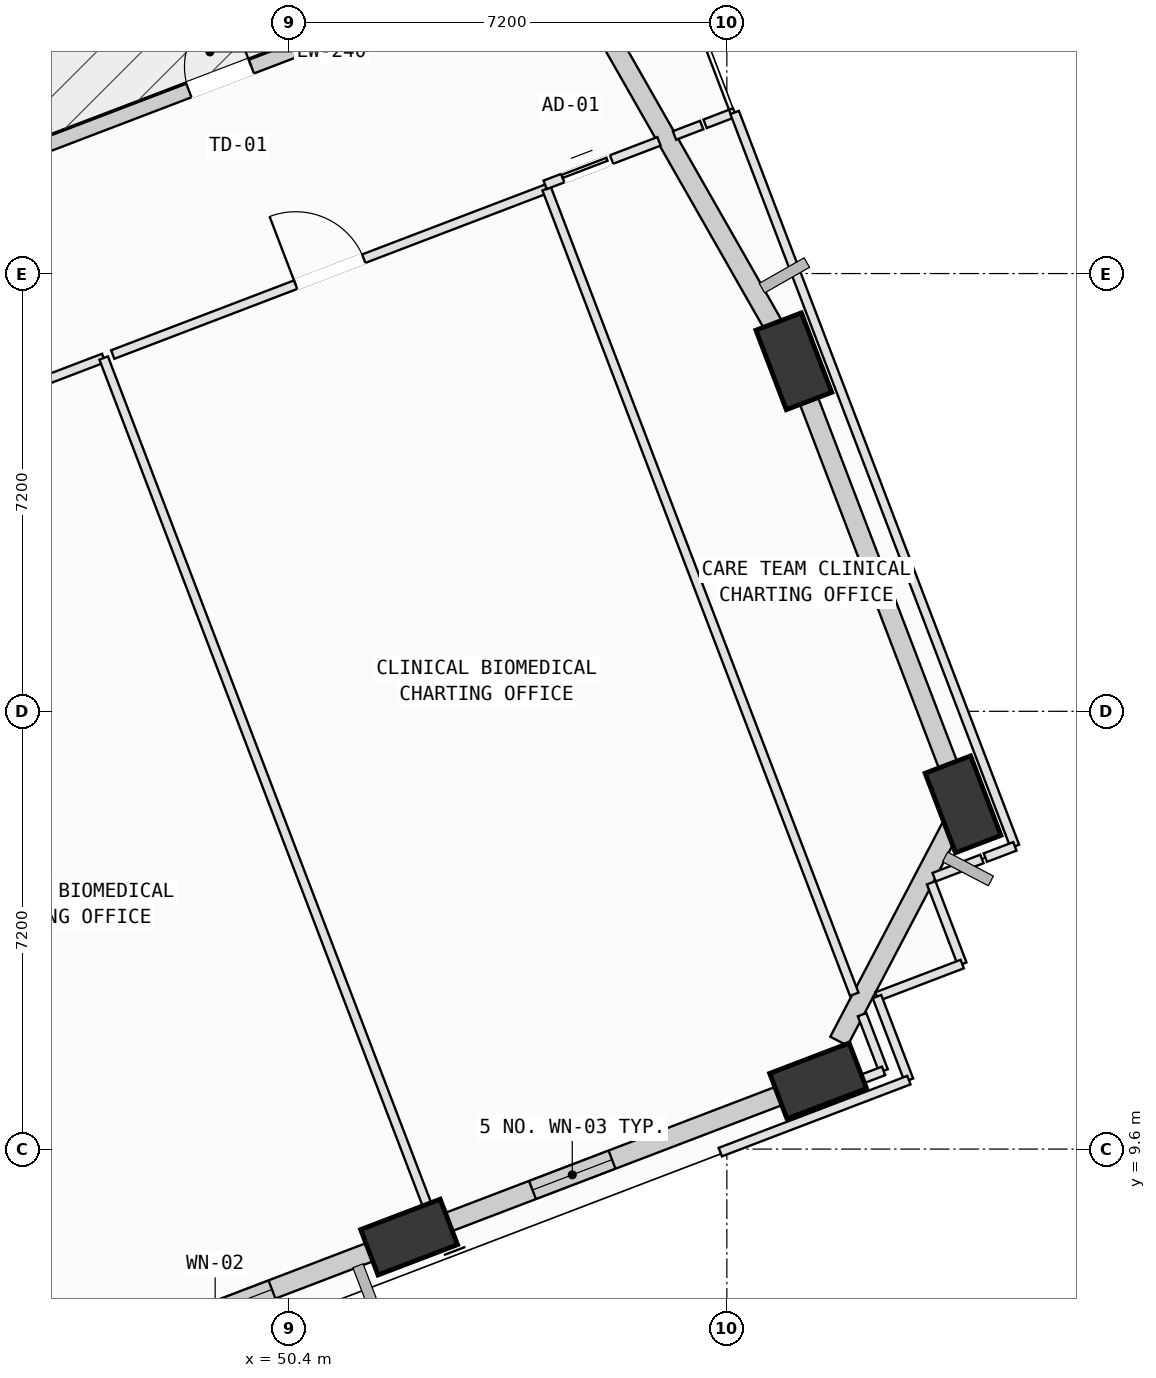
"""IFC4 building model, lengths in metres.
Left out: names, types, materials, properties, quantities, classifications, styles, units other than length and angle.
Written with IfcOpenShell. Run it as: python <this file> out.ifc"""

import sys

from ifc_helpers import new_model, si_unit, direction, frame, frame_2d, origin, origin_2d, place, context, subcontext, project, spatial, rectangle, extrude, element, fill, save


model = new_model("IFC4")
c1 = context("Model", 3, precision=1e-05, world=origin(), true_north=direction((0.0, 1.0)))
c2 = subcontext(c1, "Body", "Model", "MODEL_VIEW")
j1 = project(units=[si_unit("LENGTHUNIT", "METRE"), si_unit("PLANEANGLEUNIT", "RADIAN")], contexts=[c1])
p1 = place(None, origin())
s1 = spatial("IfcSite", under=j1, at=p1, CompositionType="ELEMENT")
p2 = place(p1, origin())
s2 = spatial("IfcBuilding", under=s1, at=p2, CompositionType="ELEMENT")
p3 = place(p2, frame((0.0, 0.0, 112.4)))
s3 = spatial("IfcBuildingStorey", under=s2, at=p3, CompositionType="ELEMENT", Elevation=112.4)
p4 = place(p3, frame((52.374, 8.152, 0.002), z_axis=(0.067994181617, 0.077959369986, 0.994635173266), x_axis=(-0.93727055229, 0.346644050033, 0.03690276937)))
e1 = element("IfcColumn", 1, at=p4, inside=s3, PredefinedType="COLUMN", context=c2, shape_type="SweptSolid", body=[
    extrude(rectangle(XDim=1.4, YDim=0.8, at=origin_2d()), origin(), (0.0, 0.0, 1.0), 4.018),
])
p5 = place(p3, frame((59.101, 10.721, 0.002), z_axis=(0.057071849794, 0.105470719226, 0.992783325478), x_axis=(-0.990177431799, 0.133110722868, 0.042780708428)))
e2 = element("IfcColumn", 2, at=p5, inside=s3, PredefinedType="COLUMN", context=c2, shape_type="SweptSolid", body=[
    extrude(rectangle(XDim=1.4, YDim=0.8, at=origin_2d()), origin(), (0.0, 0.0, 1.0), 4.025),
])
p6 = place(p3, frame((61.484, 15.271, 0.002), z_axis=(0.038263882911, 0.115094849072, 0.992617273163), x_axis=(0.045975598862, -0.992495561747, 0.113308447267)))
e3 = element("IfcColumn", 3, at=p6, inside=s3, PredefinedType="COLUMN", context=c2, shape_type="SweptSolid", body=[
    extrude(rectangle(XDim=1.4, YDim=0.8, at=origin_2d()), origin(), (0.0, 0.0, 1.0), 4.026),
])
p7 = place(p3, frame((58.702, 22.557, 0.002), z_axis=(0.008384963589, 0.103536072138, 0.994590354946), x_axis=(0.280571284109, -0.954915121336, 0.097040535741)))
e4 = element("IfcColumn", 4, at=p7, inside=s3, PredefinedType="COLUMN", context=c2, shape_type="SweptSolid", body=[
    extrude(rectangle(XDim=1.4, YDim=0.8, at=origin_2d()), origin(), (0.0, 0.0, 1.0), 4.018),
])
p8 = place(p3, frame((46.015, 25.966, 0.0), z_axis=(0.0, 0.0, 1.0), x_axis=(0.934206271621, 0.356733292621, 0.0)))
e5 = element("IfcWall", 5, at=p8, inside=s3, PredefinedType="SOLIDWALL", context=c2, shape_type="SweptSolid", body=[
    extrude(rectangle(XDim=6.96, YDim=0.24, at=frame_2d((3.48, 0.0))), origin(), (0.0, 0.0, 1.0), 2.945),
])
p9 = place(p8, frame((2.93, 0.0, 0.0)))
e6 = element("IfcOpeningElement", 6, at=p9, cuts=e5, PredefinedType="OPENING", context=c2, shape_type="SweptSolid", body=[
    extrude(rectangle(XDim=1.1, YDim=2.15, at=frame_2d((0.55, 1.075))), frame((0.0, 0.13, 0.0), z_axis=(0.0, -1.0, 0.0), x_axis=(1.0, 0.0, 0.0)), (0.0, 0.0, 1.0), 0.26),
])
p10 = place(p3, frame((52.091, 8.044, 0.0), z_axis=(0.0, 0.0, 1.0), x_axis=(-0.93419197885, -0.356770720005, 0.0)))
e7 = element("IfcWall", 7, at=p10, inside=s3, PredefinedType="SOLIDWALL", context=c2, shape_type="SweptSolid", body=[
    extrude(rectangle(XDim=6.218, YDim=0.32, at=frame_2d((3.109, 0.0))), origin(), (0.0, 0.0, 1.0), 3.165),
])
p11 = place(p10, frame((2.111, 0.0, 0.75)))
e8 = element("IfcOpeningElement", 8, at=p11, cuts=e7, PredefinedType="OPENING", context=c2, shape_type="SweptSolid", body=[
    extrude(rectangle(XDim=2.0, YDim=1.95, at=frame_2d((1.0, 0.975))), frame((0.0, 0.17, 0.0), z_axis=(0.0, -1.0, 0.0), x_axis=(1.0, 0.0, 0.0)), (0.0, 0.0, 1.0), 0.34),
])
p12 = place(p3, frame((58.832, 10.618, 0.0), z_axis=(0.0, 0.0, 1.0), x_axis=(-0.934193739587, -0.356766109541, 0.0)))
e9 = element("IfcWall", 9, at=p12, inside=s3, PredefinedType="SOLIDWALL", context=c2, shape_type="SweptSolid", body=[
    extrude(rectangle(XDim=6.242, YDim=0.32, at=frame_2d((3.121, 0.0))), origin(), (0.0, 0.0, 1.0), 3.165),
])
p13 = place(p12, frame((3.34, 0.0, 0.75)))
e10 = element("IfcOpeningElement", 10, at=p13, cuts=e9, PredefinedType="OPENING", context=c2, shape_type="SweptSolid", body=[
    extrude(rectangle(XDim=1.4, YDim=1.85, at=frame_2d((0.7, 0.925))), frame((0.0, 0.17, 0.0), z_axis=(0.0, -1.0, 0.0), x_axis=(1.0, 0.0, 0.0)), (0.0, 0.0, 1.0), 0.34),
])
p14 = place(p3, frame((61.367, 15.046, 0.0), z_axis=(0.0, 0.0, 1.0), x_axis=(-0.464095020953, -0.885785420701, 0.0)))
e11 = element("IfcWall", 11, at=p14, inside=s3, PredefinedType="SOLIDWALL", context=c2, shape_type="SweptSolid", body=[
    extrude(rectangle(XDim=4.145, YDim=0.32, at=frame_2d((2.073, 0.0))), origin(), (0.0, 0.0, 1.0), 3.165),
])
p15 = place(p3, frame((58.809, 22.277, 0.0), z_axis=(0.0, 0.0, 1.0), x_axis=(0.356722522442, -0.934210384219, 0.0)))
e12 = element("IfcWall", 12, at=p15, inside=s3, PredefinedType="SOLIDWALL", context=c2, shape_type="SweptSolid", body=[
    extrude(rectangle(XDim=6.84, YDim=0.32, at=frame_2d((3.42, 0.0))), origin(), (0.0, 0.0, 1.0), 3.165),
])
p16 = place(p3, frame((54.0, 30.803, 0.0), z_axis=(0.0, 0.0, 1.0), x_axis=(0.495311670918, -0.868715343857, 0.0)))
e13 = element("IfcWall", 13, at=p16, inside=s3, PredefinedType="SOLIDWALL", context=c2, shape_type="SweptSolid", body=[
    extrude(rectangle(XDim=8.838, YDim=0.32, at=frame_2d((4.419, 0.0))), origin(), (0.0, 0.0, 1.0), 3.165),
])
p17 = place(p3, frame((40.213, 19.886, 0.0), z_axis=(0.0, 0.0, 1.0), x_axis=(0.93423542168, 0.356656945646, 0.0)))
e14 = element("IfcWall", 14, at=p17, inside=s3, PredefinedType="PARTITIONING", context=c2, shape_type="SweptSolid", body=[
    extrude(rectangle(XDim=7.641, YDim=0.15, at=frame_2d((3.82, 0.0))), origin(), (0.0, 0.0, 1.0), 3.78),
])
p18 = place(p17, frame((3.22, 0.0, 0.0)))
e15 = element("IfcOpeningElement", 15, at=p18, cuts=e14, PredefinedType="OPENING", context=c2, shape_type="SweptSolid", body=[
    extrude(rectangle(XDim=1.2, YDim=2.15, at=frame_2d((0.6, 1.075))), frame((0.0, 0.085, 0.0), z_axis=(0.0, -1.0, 0.0), x_axis=(1.0, 0.0, 0.0)), (0.0, 0.0, 1.0), 0.17),
])
p19 = place(p3, frame((47.351, 22.611, 0.0), z_axis=(0.0, 0.0, 1.0), x_axis=(0.356735243001, -0.934205526852, 0.0)))
e16 = element("IfcWall", 16, at=p19, inside=s3, PredefinedType="PARTITIONING", context=c2, shape_type="SweptSolid", body=[
    extrude(rectangle(XDim=15.53, YDim=0.15, at=frame_2d((7.765, 0.0))), origin(), (0.0, 0.0, 1.0), 3.78),
])
p20 = place(p3, frame((52.891, 8.103, 0.0), z_axis=(0.0, 0.0, 1.0), x_axis=(-0.934316516535, -0.356444451395, 0.0)))
e17 = element("IfcWall", 17, at=p20, inside=s3, PredefinedType="PARTITIONING", context=c2, shape_type="SweptSolid", body=[
    extrude(rectangle(XDim=0.769, YDim=0.15, at=frame_2d((0.384, 0.0))), origin(), (0.0, 0.0, 1.0), 3.165),
])
p21 = place(p3, frame((47.5, 22.668, 0.0), z_axis=(0.0, 0.0, 1.0), x_axis=(0.934172491121, 0.356821743778, 0.0)))
e18 = element("IfcWall", 18, at=p21, inside=s3, PredefinedType="PARTITIONING", context=c2, shape_type="SweptSolid", body=[
    extrude(rectangle(XDim=7.64, YDim=0.15, at=frame_2d((3.82, 0.0))), origin(), (0.0, 0.0, 1.0), 3.78),
])
p22 = place(p21, frame((3.22, 0.0, 0.0)))
e19 = element("IfcOpeningElement", 19, at=p22, cuts=e18, PredefinedType="OPENING", context=c2, shape_type="SweptSolid", body=[
    extrude(rectangle(XDim=1.2, YDim=2.15, at=frame_2d((0.6, 1.075))), frame((0.0, 0.085, 0.0), z_axis=(0.0, -1.0, 0.0), x_axis=(1.0, 0.0, 0.0)), (0.0, 0.0, 1.0), 0.17),
])
p23 = place(p3, frame((54.637, 25.394, 0.0), z_axis=(0.0, 0.0, 1.0), x_axis=(0.356709762007, -0.934215256613, 0.0)))
e20 = element("IfcWall", 20, at=p23, inside=s3, PredefinedType="PARTITIONING", context=c2, shape_type="SweptSolid", body=[
    extrude(rectangle(XDim=14.18, YDim=0.15, at=frame_2d((7.09, 0.0))), origin(), (0.0, 0.0, 1.0), 3.78),
])
p24 = place(p3, frame((59.824, 11.811, 0.0), z_axis=(0.0, 0.0, 1.0), x_axis=(0.356548962599, -0.934276638512, 0.0)))
e21 = element("IfcWall", 21, at=p24, inside=s3, PredefinedType="PARTITIONING", context=c2, shape_type="SweptSolid", body=[
    extrude(rectangle(XDim=0.99, YDim=0.15, at=frame_2d((0.495, 0.0))), origin(), (0.0, 0.0, 1.0), 3.78),
])
p25 = place(p3, frame((60.177, 10.886, 0.0), z_axis=(0.0, 0.0, 1.0), x_axis=(-0.93428730841, -0.356521002668, 0.0)))
e22 = element("IfcWall", 22, at=p25, inside=s3, PredefinedType="PARTITIONING", context=c2, shape_type="SweptSolid", body=[
    extrude(rectangle(XDim=1.352, YDim=0.15, at=frame_2d((0.676, 0.0))), origin(), (0.0, 0.0, 1.0), 3.78),
])
p26 = place(p3, frame((54.612, 25.459, 0.0), z_axis=(0.0, 0.0, 1.0), x_axis=(0.934153407675, 0.356871700936, 0.0)))
e23 = element("IfcWall", 23, at=p26, inside=s3, PredefinedType="PARTITIONING", context=c2, shape_type="SweptSolid", body=[
    extrude(rectangle(XDim=2.004, YDim=0.15, at=frame_2d((1.002, 0.0))), origin(), (0.0, 0.0, 1.0), 3.78),
])
p27 = place(p26, frame((0.309, 0.0, 0.0)))
e24 = element("IfcOpeningElement", 24, at=p27, cuts=e23, PredefinedType="OPENING", context=c2, shape_type="SweptSolid", body=[
    extrude(rectangle(XDim=0.86, YDim=2.06, at=frame_2d((0.43, 1.03))), frame((0.0, 0.085, 0.0), z_axis=(0.0, -1.0, 0.0), x_axis=(1.0, 0.0, 0.0)), (0.0, 0.0, 1.0), 0.17),
])
p28 = place(p3, frame((56.739, 26.271, 0.0), z_axis=(0.0, 0.0, 1.0), x_axis=(0.934066849475, 0.357098194775, 0.0)))
e25 = element("IfcWall", 25, at=p28, inside=s3, PredefinedType="PARTITIONING", context=c2, shape_type="SweptSolid", body=[
    extrude(rectangle(XDim=0.479, YDim=0.15, at=frame_2d((0.239, 0.0))), origin(), (0.0, 0.0, 1.0), 3.78),
])
p29 = place(p3, frame((61.795, 14.372, 0.0), z_axis=(0.0, 0.0, 1.0), x_axis=(-0.934225419659, -0.35668314407, 0.0)))
e26 = element("IfcWall", 26, at=p29, inside=s3, PredefinedType="PARTITIONING", context=c2, shape_type="SweptSolid", body=[
    extrude(rectangle(XDim=0.841, YDim=0.15, at=frame_2d((0.421, 0.0))), origin(), (0.0, 0.0, 1.0), 3.78),
])
p30 = place(p3, frame((60.961, 13.98, 0.0), z_axis=(0.0, 0.0, 1.0), x_axis=(0.356428093384, -0.934322756999, 0.0)))
e27 = element("IfcWall", 27, at=p30, inside=s3, PredefinedType="PARTITIONING", context=c2, shape_type="SweptSolid", body=[
    extrude(rectangle(XDim=1.431, YDim=0.15, at=frame_2d((0.715, 0.0))), origin(), (0.0, 0.0, 1.0), 3.78),
])
p31 = place(p3, frame((61.471, 12.643, 0.0), z_axis=(0.0, 0.0, 1.0), x_axis=(-0.934240071914, -0.356644764479, 0.0)))
e28 = element("IfcWall", 28, at=p31, inside=s3, PredefinedType="PARTITIONING", context=c2, shape_type="SweptSolid", body=[
    extrude(rectangle(XDim=1.5, YDim=0.15, at=frame_2d((0.75, 0.0))), origin(), (0.0, 0.0, 1.0), 3.78),
])
p32 = place(p3, frame((60.069, 12.108, 0.0), z_axis=(0.0, 0.0, 1.0), x_axis=(0.356864862049, -0.934156020285, 0.0)))
e29 = element("IfcWall", 29, at=p32, inside=s3, PredefinedType="PARTITIONING", context=c2, shape_type="SweptSolid", body=[
    extrude(rectangle(XDim=1.471, YDim=0.15, at=frame_2d((0.735, 0.0))), origin(), (0.0, 0.0, 1.0), 3.78),
])
p33 = place(p3, frame((60.594, 10.734, 0.0), z_axis=(0.0, 0.0, 1.0), x_axis=(-0.93427673548, -0.356548708511, 0.0)))
e30 = element("IfcWall", 30, at=p33, inside=s3, PredefinedType="PARTITIONING", context=c2, shape_type="SweptSolid", body=[
    extrude(rectangle(XDim=3.32, YDim=0.15, at=frame_2d((1.66, 0.0))), origin(), (0.0, 0.0, 1.0), 3.78),
])
p34 = place(p3, frame((57.242, 26.463, 0.0), z_axis=(0.0, 0.0, 1.0), x_axis=(0.933936729211, 0.357438366479, 0.0)))
e31 = element("IfcWall", 31, at=p34, inside=s3, PredefinedType="PARTITIONING", context=c2, shape_type="SweptSolid", body=[
    extrude(rectangle(XDim=0.521, YDim=0.15, at=frame_2d((0.26, 0.0))), origin(), (0.0, 0.0, 1.0), 3.78),
])
p35 = place(p3, frame((57.728, 26.649, 0.0), z_axis=(0.0, 0.0, 1.0), x_axis=(0.356729152483, -0.934207852551, 0.0)))
e32 = element("IfcWall", 32, at=p35, inside=s3, PredefinedType="PARTITIONING", context=c2, shape_type="SweptSolid", body=[
    extrude(rectangle(XDim=12.92, YDim=0.15, at=frame_2d((6.46, 0.0))), origin(), (0.0, 0.0, 1.0), 3.165),
])
p36 = place(p3, frame((62.337, 14.579, 0.0), z_axis=(0.0, 0.0, 1.0), x_axis=(-0.934502612507, -0.355956271497, 0.0)))
e33 = element("IfcWall", 33, at=p36, inside=s3, PredefinedType="PARTITIONING", context=c2, shape_type="SweptSolid", body=[
    extrude(rectangle(XDim=0.52, YDim=0.15, at=frame_2d((0.26, 0.0))), origin(), (0.0, 0.0, 1.0), 3.78),
])
p37 = place(p9, origin())
e34 = element("IfcDoor", 34, at=p37, inside=s3, OperationType="SINGLE_SWING_RIGHT", PredefinedType="DOOR", context=c2, shape_type="SweptSolid", body=[
    extrude(rectangle(XDim=1.1, YDim=2.15, at=frame_2d((0.55, 1.075))), frame((0.0, 0.025, 0.0), z_axis=(0.0, -1.0, 0.0), x_axis=(1.0, 0.0, 0.0)), (0.0, 0.0, 1.0), 0.05),
])
fill(e6, e34)
p38 = place(p11, origin())
e35 = element("IfcWindow", 35, at=p38, inside=s3, PartitioningType="SINGLE_PANEL", PredefinedType="WINDOW", context=c2, shape_type="SweptSolid", body=[
    extrude(rectangle(XDim=2.0, YDim=1.95, at=frame_2d((1.0, 0.975))), frame((0.0, 0.03, 0.0), z_axis=(0.0, -1.0, 0.0), x_axis=(1.0, 0.0, 0.0)), (0.0, 0.0, 1.0), 0.06),
])
fill(e8, e35)
p39 = place(p13, origin())
e36 = element("IfcWindow", 36, at=p39, inside=s3, PartitioningType="SINGLE_PANEL", PredefinedType="WINDOW", context=c2, shape_type="SweptSolid", body=[
    extrude(rectangle(XDim=1.4, YDim=1.85, at=frame_2d((0.7, 0.925))), frame((0.0, 0.03, 0.0), z_axis=(0.0, -1.0, 0.0), x_axis=(1.0, 0.0, 0.0)), (0.0, 0.0, 1.0), 0.06),
])
fill(e10, e36)
p40 = place(p22, origin())
e37 = element("IfcDoor", 37, at=p40, inside=s3, OperationType="SINGLE_SWING_LEFT", PredefinedType="DOOR", context=c2, shape_type="SweptSolid", body=[
    extrude(rectangle(XDim=1.2, YDim=2.15, at=frame_2d((0.6, 1.075))), frame((0.0, 0.025, 0.0), z_axis=(0.0, -1.0, 0.0), x_axis=(1.0, 0.0, 0.0)), (0.0, 0.0, 1.0), 0.05),
])
fill(e19, e37)
p41 = place(p27, origin())
e38 = element("IfcDoor", 38, at=p41, inside=s3, OperationType="SLIDING_TO_LEFT", PredefinedType="DOOR", context=c2, shape_type="SweptSolid", body=[
    extrude(rectangle(XDim=0.86, YDim=2.06, at=frame_2d((0.43, 1.03))), frame((0.0, 0.025, 0.0), z_axis=(0.0, -1.0, 0.0), x_axis=(1.0, 0.0, 0.0)), (0.0, 0.0, 1.0), 0.05),
])
fill(e24, e38)
save(model, sys.argv[1])
